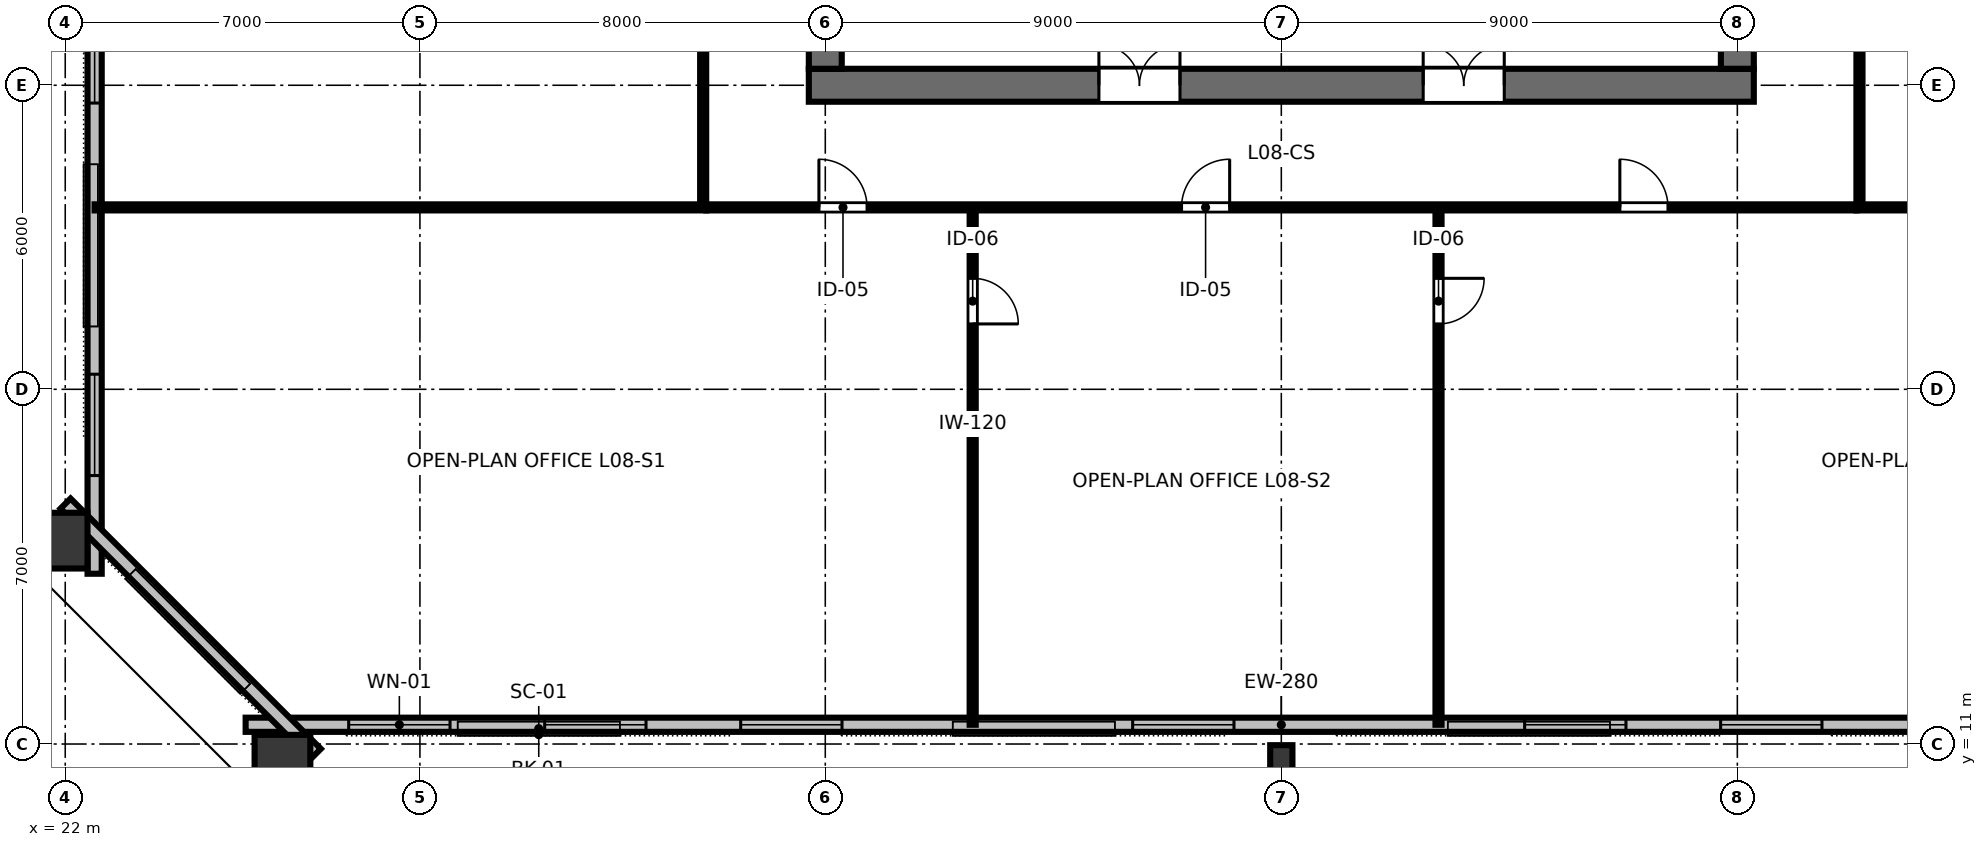
"""IFC4 building model, lengths in metres.
Left out: names, types, materials, properties, quantities, classifications, styles, units other than length and angle.
Written with IfcOpenShell. Run it as: python <this file> out.ifc"""

import sys

from ifc_helpers import new_model, si_unit, direction, frame, frame_2d, origin, origin_2d, place, context, subcontext, project, spatial, rectangle, hollow_rectangle, i_section, extrude, element, fill, save


model = new_model("IFC4")
c1 = context("Model", 3, precision=1e-05, world=origin(), true_north=direction((0.0, 1.0)))
c2 = subcontext(c1, "Body", "Model", "MODEL_VIEW")
j1 = project(units=[si_unit("LENGTHUNIT", "METRE"), si_unit("PLANEANGLEUNIT", "RADIAN")], contexts=[c1])
p1 = place(None, origin())
s1 = spatial("IfcSite", under=j1, at=p1, CompositionType="ELEMENT")
p2 = place(p1, origin())
s2 = spatial("IfcBuilding", under=s1, at=p2, CompositionType="ELEMENT")
p3 = place(p2, frame((0.0, 0.0, 35.2)))
s3 = spatial("IfcBuildingStorey", under=s2, at=p3, CompositionType="ELEMENT", Elevation=35.2)
p4 = place(p3, frame((36.675, 24.0, 0.0), z_axis=(0.0, 0.0, 1.0), x_axis=(1.0, 0.0, 0.0)))
e1 = element("IfcWall", 1, at=p4, inside=s3, PredefinedType="SHEAR", context=c2, shape_type="SweptSolid", body=[
    extrude(rectangle(XDim=18.65, YDim=0.65, at=frame_2d((9.325, 0.0))), origin(), (0.0, 0.0, 1.0), 3.36),
])
p5 = place(p4, frame((5.725, 0.0, 0.0)))
e2 = element("IfcOpeningElement", 2, at=p5, cuts=e1, PredefinedType="OPENING", context=c2, shape_type="SweptSolid", body=[
    extrude(rectangle(XDim=1.6, YDim=2.15, at=frame_2d((0.8, 1.075))), frame((0.0, 0.335, 0.0), z_axis=(0.0, -1.0, 0.0), x_axis=(1.0, 0.0, 0.0)), (0.0, 0.0, 1.0), 0.67),
])
p6 = place(p4, frame((12.125, 0.0, 0.0)))
e3 = element("IfcOpeningElement", 3, at=p6, cuts=e1, PredefinedType="OPENING", context=c2, shape_type="SweptSolid", body=[
    extrude(rectangle(XDim=1.6, YDim=2.15, at=frame_2d((0.8, 1.075))), frame((0.0, 0.335, 0.0), z_axis=(0.0, -1.0, 0.0), x_axis=(1.0, 0.0, 0.0)), (0.0, 0.0, 1.0), 0.67),
])
p7 = place(p3, frame((37.0, 24.325, 0.0), z_axis=(0.0, 0.0, 1.0), x_axis=(0.0, 1.0, 0.0)))
e4 = element("IfcWall", 4, at=p7, inside=s3, PredefinedType="SHEAR", context=c2, shape_type="SweptSolid", body=[
    extrude(rectangle(XDim=15.35, YDim=0.65, at=frame_2d((7.675, 0.0))), origin(), (0.0, 0.0, 1.0), 3.36),
])
p8 = place(p7, frame((5.2, 0.0, 0.0)))
e5 = element("IfcOpeningElement", 5, at=p8, cuts=e4, PredefinedType="OPENING", context=c2, shape_type="SweptSolid", body=[
    extrude(rectangle(XDim=1.15, YDim=2.15, at=frame_2d((0.575, 1.075))), frame((0.0, 0.335, 0.0), z_axis=(0.0, -1.0, 0.0), x_axis=(1.0, 0.0, 0.0)), (0.0, 0.0, 1.0), 0.67),
])
p9 = place(p3, frame((55.0, 24.325, 0.0), z_axis=(0.0, 0.0, 1.0), x_axis=(0.0, 1.0, 0.0)))
e6 = element("IfcWall", 6, at=p9, inside=s3, PredefinedType="SHEAR", context=c2, shape_type="SweptSolid", body=[
    extrude(rectangle(XDim=15.35, YDim=0.65, at=frame_2d((7.675, 0.0))), origin(), (0.0, 0.0, 1.0), 3.36),
])
p10 = place(p9, frame((5.2, 0.0, 0.0)))
e7 = element("IfcOpeningElement", 7, at=p10, cuts=e6, PredefinedType="OPENING", context=c2, shape_type="SweptSolid", body=[
    extrude(rectangle(XDim=1.15, YDim=2.15, at=frame_2d((0.575, 1.075))), frame((0.0, 0.335, 0.0), z_axis=(0.0, -1.0, 0.0), x_axis=(1.0, 0.0, 0.0)), (0.0, 0.0, 1.0), 0.67),
])
p11 = place(p3, frame((26.287, 10.531, 0.0), z_axis=(-0.047968316961, -0.09439424431, 0.994378583442), x_axis=(0.891494829719, -0.453030869351, 0.0)))
e8 = element("IfcColumn", 8, at=p11, inside=s3, PredefinedType="COLUMN", context=c2, shape_type="SweptSolid", body=[
    extrude(hollow_rectangle(XDim=1.1, YDim=1.3, WallThickness=0.07, at=origin_2d()), origin(), (0.0, 0.0, 1.0), 3.166),
])
p12 = place(p3, frame((46.0, 10.72, 0.0), z_axis=(0.0, -0.094885603902, 0.995488182839), x_axis=(1.0, 0.0, 0.0)))
e9 = element("IfcColumn", 9, at=p12, inside=s3, PredefinedType="COLUMN", context=c2, shape_type="SweptSolid", body=[
    extrude(i_section(OverallWidth=0.439, OverallDepth=0.514, WebThickness=0.06, FlangeThickness=0.097, FilletRadius=0.025, at=origin_2d()), origin(), (0.0, 0.0, 1.0), 3.162),
])
p13 = place(p3, frame((21.789, 15.013, 0.0), z_axis=(-0.10994269781, -0.032281703141, 0.993413556803), x_axis=(0.953174231432, 0.279873863329, 0.114584052814)))
e10 = element("IfcColumn", 10, at=p13, inside=s3, PredefinedType="COLUMN", context=c2, shape_type="SweptSolid", body=[
    extrude(hollow_rectangle(XDim=1.1, YDim=1.3, WallThickness=0.07, at=origin_2d()), origin(), (0.0, 0.0, 1.0), 3.169),
])
p14 = place(p3, frame((25.56, 11.38, 0.0), z_axis=(0.0, 0.0, 1.0), x_axis=(1.0, 0.0, 0.0)))
e11 = element("IfcWall", 11, at=p14, inside=s3, PredefinedType="STANDARD", context=c2, shape_type="SweptSolid", body=[
    extrude(rectangle(XDim=40.88, YDim=0.28, at=frame_2d((20.44, 0.0))), origin(), (0.0, 0.0, 1.0), 3.15),
])
p15 = place(p14, frame((2.034, 0.0, 0.8)))
e12 = element("IfcOpeningElement", 12, at=p15, cuts=e11, PredefinedType="OPENING", context=c2, shape_type="SweptSolid", body=[
    extrude(rectangle(XDim=2.0, YDim=1.95, at=frame_2d((1.0, 0.975))), frame((0.0, 0.15, 0.0), z_axis=(0.0, -1.0, 0.0), x_axis=(1.0, 0.0, 0.0)), (0.0, 0.0, 1.0), 0.3),
])
p16 = place(p14, frame((5.902, 0.0, 0.8)))
e13 = element("IfcOpeningElement", 13, at=p16, cuts=e11, PredefinedType="OPENING", context=c2, shape_type="SweptSolid", body=[
    extrude(rectangle(XDim=2.0, YDim=1.95, at=frame_2d((1.0, 0.975))), frame((0.0, 0.15, 0.0), z_axis=(0.0, -1.0, 0.0), x_axis=(1.0, 0.0, 0.0)), (0.0, 0.0, 1.0), 0.3),
])
p17 = place(p14, frame((9.77, 0.0, 0.8)))
e14 = element("IfcOpeningElement", 14, at=p17, cuts=e11, PredefinedType="OPENING", context=c2, shape_type="SweptSolid", body=[
    extrude(rectangle(XDim=2.0, YDim=1.95, at=frame_2d((1.0, 0.975))), frame((0.0, 0.15, 0.0), z_axis=(0.0, -1.0, 0.0), x_axis=(1.0, 0.0, 0.0)), (0.0, 0.0, 1.0), 0.3),
])
p18 = place(p14, frame((17.506, 0.0, 0.8)))
e15 = element("IfcOpeningElement", 15, at=p18, cuts=e11, PredefinedType="OPENING", context=c2, shape_type="SweptSolid", body=[
    extrude(rectangle(XDim=2.0, YDim=1.95, at=frame_2d((1.0, 0.975))), frame((0.0, 0.15, 0.0), z_axis=(0.0, -1.0, 0.0), x_axis=(1.0, 0.0, 0.0)), (0.0, 0.0, 1.0), 0.3),
])
p19 = place(p14, frame((25.242, 0.0, 0.8)))
e16 = element("IfcOpeningElement", 16, at=p19, cuts=e11, PredefinedType="OPENING", context=c2, shape_type="SweptSolid", body=[
    extrude(rectangle(XDim=2.0, YDim=1.95, at=frame_2d((1.0, 0.975))), frame((0.0, 0.15, 0.0), z_axis=(0.0, -1.0, 0.0), x_axis=(1.0, 0.0, 0.0)), (0.0, 0.0, 1.0), 0.3),
])
p20 = place(p14, frame((29.11, 0.0, 0.8)))
e17 = element("IfcOpeningElement", 17, at=p20, cuts=e11, PredefinedType="OPENING", context=c2, shape_type="SweptSolid", body=[
    extrude(rectangle(XDim=2.0, YDim=1.95, at=frame_2d((1.0, 0.975))), frame((0.0, 0.15, 0.0), z_axis=(0.0, -1.0, 0.0), x_axis=(1.0, 0.0, 0.0)), (0.0, 0.0, 1.0), 0.3),
])
p21 = place(p14, frame((32.978, 0.0, 0.8)))
e18 = element("IfcOpeningElement", 18, at=p21, cuts=e11, PredefinedType="OPENING", context=c2, shape_type="SweptSolid", body=[
    extrude(rectangle(XDim=2.0, YDim=1.95, at=frame_2d((1.0, 0.975))), frame((0.0, 0.15, 0.0), z_axis=(0.0, -1.0, 0.0), x_axis=(1.0, 0.0, 0.0)), (0.0, 0.0, 1.0), 0.3),
])
p22 = place(p14, frame((36.846, 0.0, 0.8)))
e19 = element("IfcOpeningElement", 19, at=p22, cuts=e11, PredefinedType="OPENING", context=c2, shape_type="SweptSolid", body=[
    extrude(rectangle(XDim=2.0, YDim=1.95, at=frame_2d((1.0, 0.975))), frame((0.0, 0.15, 0.0), z_axis=(0.0, -1.0, 0.0), x_axis=(1.0, 0.0, 0.0)), (0.0, 0.0, 1.0), 0.3),
])
p23 = place(p3, frame((22.58, 49.64, 0.0), z_axis=(0.0, 0.0, 1.0), x_axis=(0.0, -1.0, 0.0)))
e20 = element("IfcWall", 20, at=p23, inside=s3, PredefinedType="STANDARD", context=c2, shape_type="SweptSolid", body=[
    extrude(rectangle(XDim=35.28, YDim=0.28, at=frame_2d((17.64, 0.0))), origin(), (0.0, 0.0, 1.0), 3.15),
])
p24 = place(p23, frame((1.938, 0.0, 0.8)))
e21 = element("IfcOpeningElement", 21, at=p24, cuts=e20, PredefinedType="OPENING", context=c2, shape_type="SweptSolid", body=[
    extrude(rectangle(XDim=2.0, YDim=1.95, at=frame_2d((1.0, 0.975))), frame((0.0, 0.15, 0.0), z_axis=(0.0, -1.0, 0.0), x_axis=(1.0, 0.0, 0.0)), (0.0, 0.0, 1.0), 0.3),
])
p25 = place(p23, frame((9.289, 0.0, 0.8)))
e22 = element("IfcOpeningElement", 22, at=p25, cuts=e20, PredefinedType="OPENING", context=c2, shape_type="SweptSolid", body=[
    extrude(rectangle(XDim=2.0, YDim=1.95, at=frame_2d((1.0, 0.975))), frame((0.0, 0.15, 0.0), z_axis=(0.0, -1.0, 0.0), x_axis=(1.0, 0.0, 0.0)), (0.0, 0.0, 1.0), 0.3),
])
p26 = place(p23, frame((12.964, 0.0, 0.8)))
e23 = element("IfcOpeningElement", 23, at=p26, cuts=e20, PredefinedType="OPENING", context=c2, shape_type="SweptSolid", body=[
    extrude(rectangle(XDim=2.0, YDim=1.95, at=frame_2d((1.0, 0.975))), frame((0.0, 0.15, 0.0), z_axis=(0.0, -1.0, 0.0), x_axis=(1.0, 0.0, 0.0)), (0.0, 0.0, 1.0), 0.3),
])
p27 = place(p23, frame((23.991, 0.0, 0.8)))
e24 = element("IfcOpeningElement", 24, at=p27, cuts=e20, PredefinedType="OPENING", context=c2, shape_type="SweptSolid", body=[
    extrude(rectangle(XDim=2.0, YDim=1.95, at=frame_2d((1.0, 0.975))), frame((0.0, 0.15, 0.0), z_axis=(0.0, -1.0, 0.0), x_axis=(1.0, 0.0, 0.0)), (0.0, 0.0, 1.0), 0.3),
])
p28 = place(p23, frame((31.342, 0.0, 0.8)))
e25 = element("IfcOpeningElement", 25, at=p28, cuts=e20, PredefinedType="OPENING", context=c2, shape_type="SweptSolid", body=[
    extrude(rectangle(XDim=2.0, YDim=1.95, at=frame_2d((1.0, 0.975))), frame((0.0, 0.15, 0.0), z_axis=(0.0, -1.0, 0.0), x_axis=(1.0, 0.0, 0.0)), (0.0, 0.0, 1.0), 0.3),
])
p29 = place(p3, frame((22.006, 15.746, 0.0), z_axis=(0.0, 0.0, 1.0), x_axis=(0.707106781187, -0.707106781187, 0.0)))
e26 = element("IfcWall", 26, at=p29, inside=s3, PredefinedType="STANDARD", context=c2, shape_type="SweptSolid", body=[
    extrude(rectangle(XDim=6.985, YDim=0.28, at=frame_2d((3.493, 0.0))), origin(), (0.0, 0.0, 1.0), 3.15),
])
p30 = place(p3, frame((39.909, 21.59, 0.0), z_axis=(0.0, 0.0, 1.0), x_axis=(0.0, -1.0, 0.0)))
e27 = element("IfcWall", 27, at=p30, inside=s3, PredefinedType="PARTITIONING", context=c2, shape_type="SweptSolid", body=[
    extrude(rectangle(XDim=10.21, YDim=0.12, at=frame_2d((5.105, 0.0))), origin(), (0.0, 0.0, 1.0), 2.43),
])
p31 = place(p30, frame((1.4, 0.0, 0.0)))
e28 = element("IfcOpeningElement", 28, at=p31, cuts=e27, PredefinedType="OPENING", context=c2, shape_type="SweptSolid", body=[
    extrude(rectangle(XDim=0.9, YDim=2.15, at=frame_2d((0.45, 1.075))), frame((0.0, 0.07, 0.0), z_axis=(0.0, -1.0, 0.0), x_axis=(1.0, 0.0, 0.0)), (0.0, 0.0, 1.0), 0.14),
])
p32 = place(p3, frame((49.102, 21.59, 0.0), z_axis=(0.0, 0.0, 1.0), x_axis=(0.0, -1.0, 0.0)))
e29 = element("IfcWall", 29, at=p32, inside=s3, PredefinedType="PARTITIONING", context=c2, shape_type="SweptSolid", body=[
    extrude(rectangle(XDim=10.21, YDim=0.12, at=frame_2d((5.105, 0.0))), origin(), (0.0, 0.0, 1.0), 2.43),
])
p33 = place(p32, frame((1.4, 0.0, 0.0)))
e30 = element("IfcOpeningElement", 30, at=p33, cuts=e29, PredefinedType="OPENING", context=c2, shape_type="SweptSolid", body=[
    extrude(rectangle(XDim=0.9, YDim=2.15, at=frame_2d((0.45, 1.075))), frame((0.0, 0.07, 0.0), z_axis=(0.0, -1.0, 0.0), x_axis=(1.0, 0.0, 0.0)), (0.0, 0.0, 1.0), 0.14),
])
p34 = place(p3, frame((34.65, 21.59, 0.0), z_axis=(0.0, 0.0, 1.0), x_axis=(1.0, 0.0, 0.0)))
e31 = element("IfcWall", 31, at=p34, inside=s3, PredefinedType="PARTITIONING", context=c2, shape_type="SweptSolid", body=[
    extrude(rectangle(XDim=22.7, YDim=0.12, at=frame_2d((11.35, 0.0))), origin(), (0.0, 0.0, 1.0), 2.43),
])
p35 = place(p34, frame((2.224, 0.0, 0.0)))
e32 = element("IfcOpeningElement", 32, at=p35, cuts=e31, PredefinedType="OPENING", context=c2, shape_type="SweptSolid", body=[
    extrude(rectangle(XDim=0.95, YDim=2.15, at=frame_2d((0.475, 1.075))), frame((0.0, 0.07, 0.0), z_axis=(0.0, -1.0, 0.0), x_axis=(1.0, 0.0, 0.0)), (0.0, 0.0, 1.0), 0.14),
])
p36 = place(p34, frame((9.381, 0.0, 0.0)))
e33 = element("IfcOpeningElement", 33, at=p36, cuts=e31, PredefinedType="OPENING", context=c2, shape_type="SweptSolid", body=[
    extrude(rectangle(XDim=0.95, YDim=2.15, at=frame_2d((0.475, 1.075))), frame((0.0, 0.07, 0.0), z_axis=(0.0, -1.0, 0.0), x_axis=(1.0, 0.0, 0.0)), (0.0, 0.0, 1.0), 0.14),
])
p37 = place(p34, frame((18.031, 0.0, 0.0)))
e34 = element("IfcOpeningElement", 34, at=p37, cuts=e31, PredefinedType="OPENING", context=c2, shape_type="SweptSolid", body=[
    extrude(rectangle(XDim=0.95, YDim=2.15, at=frame_2d((0.475, 1.075))), frame((0.0, 0.07, 0.0), z_axis=(0.0, -1.0, 0.0), x_axis=(1.0, 0.0, 0.0)), (0.0, 0.0, 1.0), 0.14),
])
p38 = place(p3, frame((34.59, 21.65, 0.0), z_axis=(0.0, 0.0, 1.0), x_axis=(0.0, 1.0, 0.0)))
e35 = element("IfcWall", 35, at=p38, inside=s3, PredefinedType="PARTITIONING", context=c2, shape_type="SweptSolid", body=[
    extrude(rectangle(XDim=20.7, YDim=0.12, at=frame_2d((10.35, 0.0))), origin(), (0.0, 0.0, 1.0), 2.43),
])
p39 = place(p38, frame((3.161, 0.0, 0.0)))
e36 = element("IfcOpeningElement", 36, at=p39, cuts=e35, PredefinedType="OPENING", context=c2, shape_type="SweptSolid", body=[
    extrude(rectangle(XDim=0.95, YDim=2.15, at=frame_2d((0.475, 1.075))), frame((0.0, 0.07, 0.0), z_axis=(0.0, -1.0, 0.0), x_axis=(1.0, 0.0, 0.0)), (0.0, 0.0, 1.0), 0.14),
])
p40 = place(p38, frame((13.311, 0.0, 0.0)))
e37 = element("IfcOpeningElement", 37, at=p40, cuts=e35, PredefinedType="OPENING", context=c2, shape_type="SweptSolid", body=[
    extrude(rectangle(XDim=0.95, YDim=2.15, at=frame_2d((0.475, 1.075))), frame((0.0, 0.07, 0.0), z_axis=(0.0, -1.0, 0.0), x_axis=(1.0, 0.0, 0.0)), (0.0, 0.0, 1.0), 0.14),
])
p41 = place(p3, frame((57.41, 21.65, 0.0), z_axis=(0.0, 0.0, 1.0), x_axis=(0.0, 1.0, 0.0)))
e38 = element("IfcWall", 38, at=p41, inside=s3, PredefinedType="PARTITIONING", context=c2, shape_type="SweptSolid", body=[
    extrude(rectangle(XDim=20.7, YDim=0.12, at=frame_2d((10.35, 0.0))), origin(), (0.0, 0.0, 1.0), 2.43),
])
p42 = place(p41, frame((5.31, 0.0, 0.0)))
e39 = element("IfcOpeningElement", 39, at=p42, cuts=e38, PredefinedType="OPENING", context=c2, shape_type="SweptSolid", body=[
    extrude(rectangle(XDim=0.95, YDim=2.15, at=frame_2d((0.475, 1.075))), frame((0.0, 0.07, 0.0), z_axis=(0.0, -1.0, 0.0), x_axis=(1.0, 0.0, 0.0)), (0.0, 0.0, 1.0), 0.14),
])
p43 = place(p41, frame((15.459, 0.0, 0.0)))
e40 = element("IfcOpeningElement", 40, at=p43, cuts=e38, PredefinedType="OPENING", context=c2, shape_type="SweptSolid", body=[
    extrude(rectangle(XDim=0.95, YDim=2.15, at=frame_2d((0.475, 1.075))), frame((0.0, 0.07, 0.0), z_axis=(0.0, -1.0, 0.0), x_axis=(1.0, 0.0, 0.0)), (0.0, 0.0, 1.0), 0.14),
])
for number, where, z_axis, x_axis in (
    (41, (34.65, 21.59, 0.0), (0.0, 0.0, 1.0), (-1.0, 0.0, 0.0)),
    (42, (57.35, 21.59, 0.0), (0.0, 0.0, 1.0), (1.0, 0.0, 0.0)),
):
    element("IfcWall", number, at=place(p3, frame(where, z_axis=z_axis, x_axis=x_axis)), inside=s3, PredefinedType="PARTITIONING", context=c2, shape_type="SweptSolid", body=[
        extrude(rectangle(XDim=12.07, YDim=0.12, at=frame_2d((6.035, 0.0))), origin(), (0.0, 0.0, 1.0), 2.43),
    ])
p44 = place(p15, origin())
e43 = element("IfcWindow", 43, at=p44, inside=s3, PartitioningType="SINGLE_PANEL", PredefinedType="WINDOW", context=c2, shape_type="SweptSolid", body=[
    extrude(rectangle(XDim=2.0, YDim=1.95, at=frame_2d((1.0, 0.975))), frame((0.0, 0.03, 0.0), z_axis=(0.0, -1.0, 0.0), x_axis=(1.0, 0.0, 0.0)), (0.0, 0.0, 1.0), 0.06),
])
fill(e12, e43)
p45 = place(p16, origin())
e44 = element("IfcWindow", 44, at=p45, inside=s3, PartitioningType="SINGLE_PANEL", PredefinedType="WINDOW", context=c2, shape_type="SweptSolid", body=[
    extrude(rectangle(XDim=2.0, YDim=1.95, at=frame_2d((1.0, 0.975))), frame((0.0, 0.03, 0.0), z_axis=(0.0, -1.0, 0.0), x_axis=(1.0, 0.0, 0.0)), (0.0, 0.0, 1.0), 0.06),
])
fill(e13, e44)
p46 = place(p17, origin())
e45 = element("IfcWindow", 45, at=p46, inside=s3, PartitioningType="SINGLE_PANEL", PredefinedType="WINDOW", context=c2, shape_type="SweptSolid", body=[
    extrude(rectangle(XDim=2.0, YDim=1.95, at=frame_2d((1.0, 0.975))), frame((0.0, 0.03, 0.0), z_axis=(0.0, -1.0, 0.0), x_axis=(1.0, 0.0, 0.0)), (0.0, 0.0, 1.0), 0.06),
])
fill(e14, e45)
p47 = place(p18, origin())
e46 = element("IfcWindow", 46, at=p47, inside=s3, PartitioningType="SINGLE_PANEL", PredefinedType="WINDOW", context=c2, shape_type="SweptSolid", body=[
    extrude(rectangle(XDim=2.0, YDim=1.95, at=frame_2d((1.0, 0.975))), frame((0.0, 0.03, 0.0), z_axis=(0.0, -1.0, 0.0), x_axis=(1.0, 0.0, 0.0)), (0.0, 0.0, 1.0), 0.06),
])
fill(e15, e46)
p48 = place(p19, origin())
e47 = element("IfcWindow", 47, at=p48, inside=s3, PartitioningType="SINGLE_PANEL", PredefinedType="WINDOW", context=c2, shape_type="SweptSolid", body=[
    extrude(rectangle(XDim=2.0, YDim=1.95, at=frame_2d((1.0, 0.975))), frame((0.0, 0.03, 0.0), z_axis=(0.0, -1.0, 0.0), x_axis=(1.0, 0.0, 0.0)), (0.0, 0.0, 1.0), 0.06),
])
fill(e16, e47)
p49 = place(p20, origin())
e48 = element("IfcWindow", 48, at=p49, inside=s3, PartitioningType="SINGLE_PANEL", PredefinedType="WINDOW", context=c2, shape_type="SweptSolid", body=[
    extrude(rectangle(XDim=2.0, YDim=1.95, at=frame_2d((1.0, 0.975))), frame((0.0, 0.03, 0.0), z_axis=(0.0, -1.0, 0.0), x_axis=(1.0, 0.0, 0.0)), (0.0, 0.0, 1.0), 0.06),
])
fill(e17, e48)
p50 = place(p27, origin())
e49 = element("IfcWindow", 49, at=p50, inside=s3, PartitioningType="SINGLE_PANEL", PredefinedType="WINDOW", context=c2, shape_type="SweptSolid", body=[
    extrude(rectangle(XDim=2.0, YDim=1.95, at=frame_2d((1.0, 0.975))), frame((0.0, 0.03, 0.0), z_axis=(0.0, -1.0, 0.0), x_axis=(1.0, 0.0, 0.0)), (0.0, 0.0, 1.0), 0.06),
])
fill(e24, e49)
p51 = place(p28, origin())
e50 = element("IfcWindow", 50, at=p51, inside=s3, PartitioningType="SINGLE_PANEL", PredefinedType="WINDOW", context=c2, shape_type="SweptSolid", body=[
    extrude(rectangle(XDim=2.0, YDim=1.95, at=frame_2d((1.0, 0.975))), frame((0.0, 0.03, 0.0), z_axis=(0.0, -1.0, 0.0), x_axis=(1.0, 0.0, 0.0)), (0.0, 0.0, 1.0), 0.06),
])
fill(e25, e50)
p52 = place(p5, origin())
e51 = element("IfcDoor", 51, at=p52, inside=s3, OperationType="DOUBLE_DOOR_SINGLE_SWING", PredefinedType="DOOR", context=c2, shape_type="SweptSolid", body=[
    extrude(rectangle(XDim=1.6, YDim=2.15, at=frame_2d((0.8, 1.075))), frame((0.0, 0.025, 0.0), z_axis=(0.0, -1.0, 0.0), x_axis=(1.0, 0.0, 0.0)), (0.0, 0.0, 1.0), 0.05),
])
fill(e2, e51)
p53 = place(p6, origin())
e52 = element("IfcDoor", 52, at=p53, inside=s3, OperationType="DOUBLE_DOOR_SINGLE_SWING", PredefinedType="DOOR", context=c2, shape_type="SweptSolid", body=[
    extrude(rectangle(XDim=1.6, YDim=2.15, at=frame_2d((0.8, 1.075))), frame((0.0, 0.025, 0.0), z_axis=(0.0, -1.0, 0.0), x_axis=(1.0, 0.0, 0.0)), (0.0, 0.0, 1.0), 0.05),
])
fill(e3, e52)
p54 = place(p31, origin())
e53 = element("IfcDoor", 53, at=p54, inside=s3, OperationType="SINGLE_SWING_RIGHT", PredefinedType="DOOR", context=c2, shape_type="SweptSolid", body=[
    extrude(rectangle(XDim=0.9, YDim=2.15, at=frame_2d((0.45, 1.075))), frame((0.0, 0.025, 0.0), z_axis=(0.0, -1.0, 0.0), x_axis=(1.0, 0.0, 0.0)), (0.0, 0.0, 1.0), 0.05),
])
fill(e28, e53)
p55 = place(p33, origin())
e54 = element("IfcDoor", 54, at=p55, inside=s3, OperationType="SINGLE_SWING_LEFT", PredefinedType="DOOR", context=c2, shape_type="SweptSolid", body=[
    extrude(rectangle(XDim=0.9, YDim=2.15, at=frame_2d((0.45, 1.075))), frame((0.0, 0.025, 0.0), z_axis=(0.0, -1.0, 0.0), x_axis=(1.0, 0.0, 0.0)), (0.0, 0.0, 1.0), 0.05),
])
fill(e30, e54)
p56 = place(p35, origin())
e55 = element("IfcDoor", 55, at=p56, inside=s3, OperationType="SINGLE_SWING_LEFT", PredefinedType="DOOR", context=c2, shape_type="SweptSolid", body=[
    extrude(rectangle(XDim=0.95, YDim=2.15, at=frame_2d((0.475, 1.075))), frame((0.0, 0.025, 0.0), z_axis=(0.0, -1.0, 0.0), x_axis=(1.0, 0.0, 0.0)), (0.0, 0.0, 1.0), 0.05),
])
fill(e32, e55)
p57 = place(p36, origin())
e56 = element("IfcDoor", 56, at=p57, inside=s3, OperationType="SINGLE_SWING_RIGHT", PredefinedType="DOOR", context=c2, shape_type="SweptSolid", body=[
    extrude(rectangle(XDim=0.95, YDim=2.15, at=frame_2d((0.475, 1.075))), frame((0.0, 0.025, 0.0), z_axis=(0.0, -1.0, 0.0), x_axis=(1.0, 0.0, 0.0)), (0.0, 0.0, 1.0), 0.05),
])
fill(e33, e56)
p58 = place(p37, origin())
e57 = element("IfcDoor", 57, at=p58, inside=s3, OperationType="SINGLE_SWING_LEFT", PredefinedType="DOOR", context=c2, shape_type="SweptSolid", body=[
    extrude(rectangle(XDim=0.95, YDim=2.15, at=frame_2d((0.475, 1.075))), frame((0.0, 0.025, 0.0), z_axis=(0.0, -1.0, 0.0), x_axis=(1.0, 0.0, 0.0)), (0.0, 0.0, 1.0), 0.05),
])
fill(e34, e57)
save(model, sys.argv[1])
